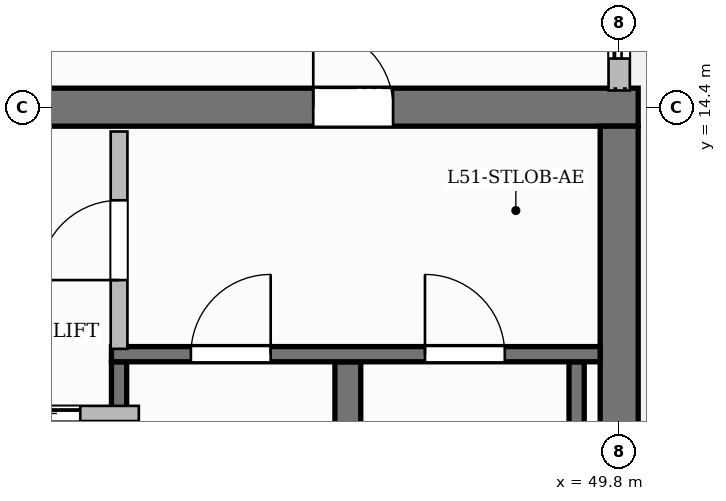
"""IFC4 building model, lengths in metres.
Left out: names, types, materials, properties, quantities, classifications, styles, units other than length and angle.
Written with IfcOpenShell. Run it as: python <this file> out.ifc"""

import sys

from ifc_helpers import new_model, si_unit, direction, frame, frame_2d, origin, place, context, subcontext, project, spatial, rectangle, extrude, source, transform, mapped, element, fill, save


model = new_model("IFC4")
c1 = context("Model", 3, precision=1e-05, world=origin(), true_north=direction((0.0, 1.0)))
c2 = subcontext(c1, "Body", "Model", "MODEL_VIEW")
j1 = project(units=[si_unit("LENGTHUNIT", "METRE"), si_unit("PLANEANGLEUNIT", "RADIAN")], contexts=[c1])
p1 = place(None, origin())
s1 = spatial("IfcSite", under=j1, at=p1, CompositionType="ELEMENT")
p2 = place(p1, origin())
s2 = spatial("IfcBuilding", under=s1, at=p2, CompositionType="ELEMENT")
p3 = place(p2, frame((0.0, 0.0, 205.75)))
s3 = spatial("IfcBuildingStorey", under=s2, at=p3, CompositionType="ELEMENT", Elevation=205.75)
p4 = place(p3, frame((34.55, 14.4, 0.0), z_axis=(0.0, 0.0, 1.0), x_axis=(1.0, 0.0, 0.0)))
e1 = element("IfcWall", 1, at=p4, inside=s3, PredefinedType="SHEAR", context=c2, shape_type="SweptSolid", body=[
    extrude(rectangle(XDim=15.5, YDim=0.5, at=frame_2d((7.75, 0.0))), origin(), (0.0, 0.0, 1.0), 3.85),
])
p5 = place(p4, frame((5.38, 0.0, 0.0)))
e2 = element("IfcOpeningElement", 2, at=p5, cuts=e1, PredefinedType="OPENING", context=c2, shape_type="SweptSolid", body=[
    extrude(rectangle(XDim=1.5, YDim=2.2, at=frame_2d((0.75, 1.1))), frame((0.0, 0.26, 0.0), z_axis=(0.0, -1.0, 0.0), x_axis=(1.0, 0.0, 0.0)), (0.0, 0.0, 1.0), 0.52),
])
p6 = place(p4, frame((1.595, 0.0, 0.0)))
e3 = element("IfcOpeningElement", 3, at=p6, cuts=e1, PredefinedType="OPENING", context=c2, shape_type="SweptSolid", body=[
    extrude(rectangle(XDim=1.05, YDim=2.15, at=frame_2d((0.525, 1.075))), frame((0.0, 0.26, 0.0), z_axis=(0.0, -1.0, 0.0), x_axis=(1.0, 0.0, 0.0)), (0.0, 0.0, 1.0), 0.52),
])
p7 = place(p4, frame((11.225, 0.0, 0.0)))
e4 = element("IfcOpeningElement", 4, at=p7, cuts=e1, PredefinedType="OPENING", context=c2, shape_type="SweptSolid", body=[
    extrude(rectangle(XDim=1.05, YDim=2.15, at=frame_2d((0.525, 1.075))), frame((0.0, 0.26, 0.0), z_axis=(0.0, -1.0, 0.0), x_axis=(1.0, 0.0, 0.0)), (0.0, 0.0, 1.0), 0.52),
])
p8 = place(p3, frame((49.8, 3.85, 0.0), z_axis=(0.0, 0.0, 1.0), x_axis=(0.0, 1.0, 0.0)))
e5 = element("IfcWall", 5, at=p8, inside=s3, PredefinedType="SHEAR", context=c2, shape_type="SweptSolid", body=[
    extrude(rectangle(XDim=10.3, YDim=0.5, at=frame_2d((5.15, 0.0))), origin(), (0.0, 0.0, 1.0), 3.85),
])
p9 = place(p3, frame((43.22, 4.1, 0.0), z_axis=(0.0, 0.0, 1.0), x_axis=(0.0, 1.0, 0.0)))
e6 = element("IfcWall", 6, at=p9, inside=s3, PredefinedType="SHEAR", context=c2, shape_type="SweptSolid", body=[
    extrude(rectangle(XDim=6.95, YDim=0.2, at=frame_2d((3.475, 0.0))), origin(), (0.0, 0.0, 1.0), 3.85),
])
p10 = place(p3, frame((46.23, 4.1, 0.0), z_axis=(0.0, 0.0, 1.0), x_axis=(0.0, 1.0, 0.0)))
e7 = element("IfcWall", 7, at=p10, inside=s3, PredefinedType="SHEAR", context=c2, shape_type="SweptSolid", body=[
    extrude(rectangle(XDim=6.95, YDim=0.34, at=frame_2d((3.475, 0.0))), origin(), (0.0, 0.0, 1.0), 3.85),
])
p11 = place(p3, frame((49.24, 4.1, 0.0), z_axis=(0.0, 0.0, 1.0), x_axis=(0.0, 1.0, 0.0)))
e8 = element("IfcWall", 8, at=p11, inside=s3, PredefinedType="SHEAR", context=c2, shape_type="SweptSolid", body=[
    extrude(rectangle(XDim=6.95, YDim=0.2, at=frame_2d((3.475, 0.0))), origin(), (0.0, 0.0, 1.0), 3.85),
])
p12 = place(p3, frame((43.12, 11.15, 0.0), z_axis=(0.0, 0.0, 1.0), x_axis=(1.0, 0.0, 0.0)))
e9 = element("IfcWall", 9, at=p12, inside=s3, PredefinedType="SHEAR", context=c2, shape_type="SweptSolid", body=[
    extrude(rectangle(XDim=6.43, YDim=0.2, at=frame_2d((3.215, 0.0))), origin(), (0.0, 0.0, 1.0), 3.85),
])
p13 = place(p12, frame((1.045, 0.0, 0.0)))
e10 = element("IfcOpeningElement", 10, at=p13, cuts=e9, PredefinedType="OPENING", context=c2, shape_type="SweptSolid", body=[
    extrude(rectangle(XDim=1.05, YDim=2.2, at=frame_2d((0.525, 1.1))), frame((0.0, 0.11, 0.0), z_axis=(0.0, -1.0, 0.0), x_axis=(1.0, 0.0, 0.0)), (0.0, 0.0, 1.0), 0.22),
])
p14 = place(p12, frame((4.125, 0.0, 0.0)))
e11 = element("IfcOpeningElement", 11, at=p14, cuts=e9, PredefinedType="OPENING", context=c2, shape_type="SweptSolid", body=[
    extrude(rectangle(XDim=1.05, YDim=2.2, at=frame_2d((0.525, 1.1))), frame((0.0, 0.11, 0.0), z_axis=(0.0, -1.0, 0.0), x_axis=(1.0, 0.0, 0.0)), (0.0, 0.0, 1.0), 0.22),
])
p15 = place(p3, frame((43.22, 11.22, 0.0), z_axis=(0.0, 0.0, 1.0), x_axis=(0.0, 1.0, 0.0)))
e12 = element("IfcWall", 12, at=p15, inside=s3, PredefinedType="PARTITIONING", context=c2, shape_type="SweptSolid", body=[
    extrude(rectangle(XDim=2.86, YDim=0.22, at=frame_2d((1.43, 0.0))), origin(), (0.0, 0.0, 1.0), 3.6),
])
p16 = place(p15, frame((0.905, 0.0, 0.0)))
e13 = element("IfcOpeningElement", 13, at=p16, cuts=e12, PredefinedType="OPENING", context=c2, shape_type="SweptSolid", body=[
    extrude(rectangle(XDim=1.05, YDim=2.15, at=frame_2d((0.525, 1.075))), frame((0.0, 0.12, 0.0), z_axis=(0.0, -1.0, 0.0), x_axis=(1.0, 0.0, 0.0)), (0.0, 0.0, 1.0), 0.24),
])
p17 = place(p3, frame((40.84, 10.37, 0.0), z_axis=(0.0, 0.0, 1.0), x_axis=(1.0, 0.0, 0.0)))
e14 = element("IfcWall", 14, at=p17, inside=s3, PredefinedType="PARTITIONING", context=c2, shape_type="SweptSolid", body=[
    extrude(rectangle(XDim=2.64, YDim=0.2, at=frame_2d((1.32, 0.0))), origin(), (0.0, 0.0, 1.0), 3.6),
])
p18 = place(p17, frame((0.77, 0.0, 0.0)))
e15 = element("IfcOpeningElement", 15, at=p18, cuts=e14, PredefinedType="OPENING", context=c2, shape_type="SweptSolid", body=[
    extrude(rectangle(XDim=1.1, YDim=2.2, at=frame_2d((0.55, 1.1))), frame((0.0, 0.11, 0.0), z_axis=(0.0, -1.0, 0.0), x_axis=(1.0, 0.0, 0.0)), (0.0, 0.0, 1.0), 0.22),
])
p19 = place(p3, frame((49.8, 14.62, 0.0), z_axis=(0.0, 0.0, 1.0), x_axis=(0.0, 1.0, 0.0)))
e16 = element("IfcWall", 16, at=p19, inside=s3, PredefinedType="SOLIDWALL", context=c2, shape_type="SweptSolid", body=[
    extrude(rectangle(XDim=6.93, YDim=0.28, at=frame_2d((3.465, 0.0))), origin(), (0.0, 0.0, 1.0), 3.085),
])
p20 = place(p19, frame((0.42, 0.0, 0.0)))
e17 = element("IfcOpeningElement", 17, at=p20, cuts=e16, PredefinedType="OPENING", context=c2, shape_type="SweptSolid", body=[
    extrude(rectangle(XDim=1.2, YDim=2.2, at=frame_2d((0.6, 1.1))), frame((0.0, 0.15, 0.0), z_axis=(0.0, -1.0, 0.0), x_axis=(1.0, 0.0, 0.0)), (0.0, 0.0, 1.0), 0.3),
])
p21 = place(p19, frame((3.659, 0.0, 0.8)))
e18 = element("IfcOpeningElement", 18, at=p21, cuts=e16, PredefinedType="OPENING", context=c2, shape_type="SweptSolid", body=[
    extrude(rectangle(XDim=1.8, YDim=1.85, at=frame_2d((0.9, 0.925))), frame((0.0, 0.15, 0.0), z_axis=(0.0, -1.0, 0.0), x_axis=(1.0, 0.0, 0.0)), (0.0, 0.0, 1.0), 0.3),
])
m1 = source(origin(), c2, "Body", "SweptSolid", [
    extrude(rectangle(XDim=1.05, YDim=2.2, at=frame_2d((0.525, 1.1))), frame((0.0, 0.025, 0.0), z_axis=(0.0, -1.0, 0.0), x_axis=(1.0, 0.0, 0.0)), (0.0, 0.0, 1.0), 0.05),
])
p22 = place(p13, origin())
e19 = element("IfcDoor", 19, at=p22, inside=s3, OperationType="SINGLE_SWING_RIGHT", PredefinedType="DOOR", context=c2, shape_type="MappedRepresentation", body=[
    mapped(m1, transform((0.0, 0.0, 0.0), scale=1.0)),
])
fill(e10, e19)
p23 = place(p14, origin())
e20 = element("IfcDoor", 20, at=p23, inside=s3, OperationType="SINGLE_SWING_LEFT", PredefinedType="DOOR", context=c2, shape_type="MappedRepresentation", body=[
    mapped(m1, transform((0.0, 0.0, 0.0), scale=1.0)),
])
fill(e11, e20)
m2 = source(origin(), c2, "Body", "SweptSolid", [
    extrude(rectangle(XDim=1.05, YDim=2.15, at=frame_2d((0.525, 1.075))), frame((0.0, 0.025, 0.0), z_axis=(0.0, -1.0, 0.0), x_axis=(1.0, 0.0, 0.0)), (0.0, 0.0, 1.0), 0.05),
])
p24 = place(p16, origin())
e21 = element("IfcDoor", 21, at=p24, inside=s3, OperationType="SINGLE_SWING_LEFT", PredefinedType="DOOR", context=c2, shape_type="MappedRepresentation", body=[
    mapped(m2, transform((0.0, 0.0, 0.0), scale=1.0)),
])
fill(e13, e21)
p25 = place(p7, origin())
e22 = element("IfcDoor", 22, at=p25, inside=s3, OperationType="SINGLE_SWING_LEFT", PredefinedType="DOOR", context=c2, shape_type="MappedRepresentation", body=[
    mapped(m2, transform((0.0, 0.0, 0.0), scale=1.0)),
])
fill(e4, e22)
m3 = source(origin(), c2, "Body", "SweptSolid", [
    extrude(rectangle(XDim=1.1, YDim=2.2, at=frame_2d((0.55, 1.1))), frame((0.0, 0.025, 0.0), z_axis=(0.0, -1.0, 0.0), x_axis=(1.0, 0.0, 0.0)), (0.0, 0.0, 1.0), 0.05),
])
p26 = place(p18, origin())
e23 = element("IfcDoor", 23, at=p26, inside=s3, OperationType="SLIDING_TO_LEFT", PredefinedType="DOOR", context=c2, shape_type="MappedRepresentation", body=[
    mapped(m3, transform((0.0, 0.0, 0.0), scale=1.0)),
])
fill(e15, e23)
m4 = source(origin(), c2, "Body", "SweptSolid", [
    extrude(rectangle(XDim=1.2, YDim=2.2, at=frame_2d((0.6, 1.1))), frame((0.0, 0.025, 0.0), z_axis=(0.0, -1.0, 0.0), x_axis=(1.0, 0.0, 0.0)), (0.0, 0.0, 1.0), 0.05),
])
p27 = place(p20, origin())
e24 = element("IfcDoor", 24, at=p27, inside=s3, OperationType="SLIDING_TO_LEFT", PredefinedType="DOOR", context=c2, shape_type="MappedRepresentation", body=[
    mapped(m4, transform((0.0, 0.0, 0.0), scale=1.0)),
])
fill(e17, e24)
save(model, sys.argv[1])
